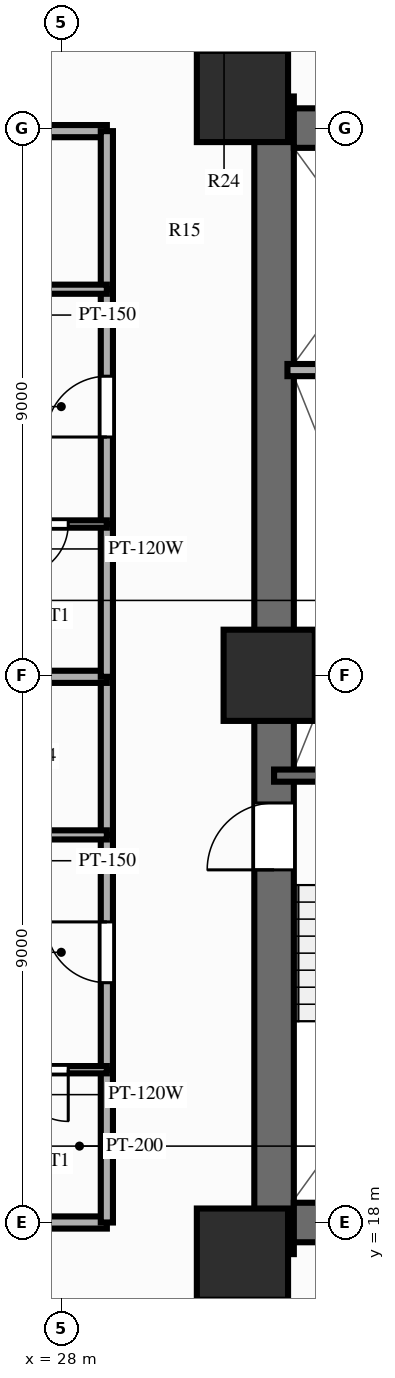
"""IFC4 building model, lengths in metres.
Left out: names, types, materials, properties, quantities, classifications, styles, units other than length and angle.
Written with IfcOpenShell. Run it as: python <this file> out.ifc"""

import sys

from ifc_helpers import new_model, si_unit, direction, frame, frame_2d, origin, origin_2d, place, context, subcontext, project, spatial, rectangle, extrude, source, transform, mapped, element, fill, save


model = new_model("IFC4")
c1 = context("Model", 3, precision=1e-05, world=origin(), true_north=direction((0.0, 1.0)))
c2 = subcontext(c1, "Body", "Model", "MODEL_VIEW")
j1 = project(units=[si_unit("LENGTHUNIT", "METRE"), si_unit("PLANEANGLEUNIT", "RADIAN")], contexts=[c1])
p1 = place(None, origin())
s1 = spatial("IfcSite", under=j1, at=p1, CompositionType="ELEMENT")
p2 = place(p1, origin())
s2 = spatial("IfcBuilding", under=s1, at=p2, CompositionType="ELEMENT")
p3 = place(p2, frame((0.0, 0.0, 43.4)))
s3 = spatial("IfcBuildingStorey", under=s2, at=p3, CompositionType="ELEMENT", Elevation=43.4)
p4 = place(p3, frame((31.5, 17.48, 0.0), z_axis=(0.0, 0.0, 1.0), x_axis=(0.0, 1.0, 0.0)))
e1 = element("IfcWall", 1, at=p4, inside=s3, PredefinedType="SHEAR", context=c2, shape_type="SweptSolid", body=[
    extrude(rectangle(XDim=19.04, YDim=0.65, at=frame_2d((9.52, 0.0))), origin(), (0.0, 0.0, 1.0), 3.0),
])
p5 = place(p4, frame((6.32, 0.0, 0.0)))
e2 = element("IfcOpeningElement", 2, at=p5, cuts=e1, PredefinedType="OPENING", context=c2, shape_type="SweptSolid", body=[
    extrude(rectangle(XDim=1.1, YDim=2.15, at=frame_2d((0.55, 1.075))), frame((0.0, 0.337, 0.0), z_axis=(0.0, -1.0, 0.0), x_axis=(1.0, 0.0, 0.0)), (0.0, 0.0, 1.0), 0.674),
])
p6 = place(p3, frame((31.825, 18.0, 0.0), z_axis=(0.0, 0.0, 1.0), x_axis=(1.0, 0.0, 0.0)))
e3 = element("IfcWall", 3, at=p6, inside=s3, PredefinedType="SHEAR", context=c2, shape_type="SweptSolid", body=[
    extrude(rectangle(XDim=12.35, YDim=0.65, at=frame_2d((6.175, 0.0))), origin(), (0.0, 0.0, 1.0), 3.0),
])
p7 = place(p3, frame((31.825, 36.0, 0.0), z_axis=(0.0, 0.0, 1.0), x_axis=(1.0, 0.0, 0.0)))
e4 = element("IfcWall", 4, at=p7, inside=s3, PredefinedType="SHEAR", context=c2, shape_type="SweptSolid", body=[
    extrude(rectangle(XDim=12.35, YDim=0.65, at=frame_2d((6.175, 0.0))), origin(), (0.0, 0.0, 1.0), 3.0),
])
p8 = place(p7, frame((5.125, 0.0, 0.0), z_axis=(0.0, 0.0, 1.0), x_axis=(-1.0, 0.0, 0.0)))
e5 = element("IfcOpeningElement", 5, at=p8, cuts=e4, PredefinedType="OPENING", context=c2, shape_type="SweptSolid", body=[
    extrude(rectangle(XDim=1.4, YDim=2.15, at=frame_2d((0.7, 1.075))), frame((0.0, 0.337, 0.0), z_axis=(0.0, -1.0, 0.0), x_axis=(1.0, 0.0, 0.0)), (0.0, 0.0, 1.0), 0.674),
])
m1 = source(origin(), c2, "Body", "SweptSolid", [
    extrude(rectangle(XDim=1.5, YDim=1.5, at=origin_2d()), origin(), (0.0, 0.0, 1.0), 3.0),
])
for number, where, z_axis, x_axis in (
    (6, (30.98, 17.48, 0.0), (0.0, 0.0, 1.0), (1.0, 0.0, 0.0)),
    (7, (30.98, 36.52, 0.0), (0.0, 0.0, 1.0), (1.0, 0.0, 0.0)),
    (8, (31.42, 27.0, 0.0), (0.0, 0.0, 1.0), (1.0, 0.0, 0.0)),
):
    element("IfcColumn", number, at=place(p3, frame(where, z_axis=z_axis, x_axis=x_axis)), inside=s3, PredefinedType="COLUMN", context=c2, shape_type="MappedRepresentation", body=[
        mapped(m1, transform((0.0, 0.0, 0.0), scale=1.0)),
    ])
p9 = place(p3, frame((31.5, 25.35, 0.0), z_axis=(0.0, 0.0, 1.0), x_axis=(1.0, 0.0, 0.0)))
e9 = element("IfcWall", 9, at=p9, inside=s3, PredefinedType="SOLIDWALL", context=c2, shape_type="SweptSolid", body=[
    extrude(rectangle(XDim=3.93, YDim=0.2, at=frame_2d((1.965, 0.0))), origin(), (0.0, 0.0, 1.0), 2.79),
])
p10 = place(p3, frame((31.72, 32.02, 0.0), z_axis=(0.0, 0.0, 1.0), x_axis=(1.0, 0.0, 0.0)))
e10 = element("IfcWall", 10, at=p10, inside=s3, PredefinedType="PARTITIONING", context=c2, shape_type="SweptSolid", body=[
    extrude(rectangle(XDim=2.8, YDim=0.2, at=frame_2d((1.4, 0.0))), origin(), (0.0, 0.0, 1.0), 2.79),
])
for number, where, z_axis, x_axis in (
    (11, (28.75, 18.0, 0.0), (0.0, 0.0, 1.0), (-1.0, 0.0, 0.0)),
    (12, (28.75, 35.95, 0.0), (0.0, 0.0, 1.0), (-1.0, 0.0, 0.0)),
):
    element("IfcWall", number, at=place(p3, frame(where, z_axis=z_axis, x_axis=x_axis)), inside=s3, PredefinedType="PARTITIONING", context=c2, shape_type="SweptSolid", body=[
        extrude(rectangle(XDim=16.6, YDim=0.2, at=frame_2d((8.3, 0.0))), origin(), (0.0, 0.0, 1.0), 2.24),
    ])
p11 = place(p3, frame((28.75, 18.0, 0.0), z_axis=(0.0, 0.0, 1.0), x_axis=(0.0, 1.0, 0.0)))
e13 = element("IfcWall", 13, at=p11, inside=s3, PredefinedType="PARTITIONING", context=c2, shape_type="SweptSolid", body=[
    extrude(rectangle(XDim=2.513, YDim=0.2, at=frame_2d((1.256, 0.0))), origin(), (0.0, 0.0, 1.0), 2.79),
])
p12 = place(p3, frame((28.75, 20.513, 0.0), z_axis=(0.0, 0.0, 1.0), x_axis=(0.0, 1.0, 0.0)))
e14 = element("IfcWall", 14, at=p12, inside=s3, PredefinedType="PARTITIONING", context=c2, shape_type="SweptSolid", body=[
    extrude(rectangle(XDim=3.862, YDim=0.2, at=frame_2d((1.931, 0.0))), origin(), (0.0, 0.0, 1.0), 2.79),
])
p13 = place(p12, frame((1.431, 0.0, 0.0)))
e15 = element("IfcOpeningElement", 15, at=p13, cuts=e14, PredefinedType="OPENING", context=c2, shape_type="SweptSolid", body=[
    extrude(rectangle(XDim=1.0, YDim=2.15, at=frame_2d((0.5, 1.075))), frame((0.0, 0.112, 0.0), z_axis=(0.0, -1.0, 0.0), x_axis=(1.0, 0.0, 0.0)), (0.0, 0.0, 1.0), 0.224),
])
p14 = place(p3, frame((28.75, 24.375, 0.0), z_axis=(0.0, 0.0, 1.0), x_axis=(0.0, 1.0, 0.0)))
e16 = element("IfcWall", 16, at=p14, inside=s3, PredefinedType="PARTITIONING", context=c2, shape_type="SweptSolid", body=[
    extrude(rectangle(XDim=2.6, YDim=0.2, at=frame_2d((1.3, 0.0))), origin(), (0.0, 0.0, 1.0), 2.79),
])
p15 = place(p3, frame((28.75, 20.513, 0.0), z_axis=(0.0, 0.0, 1.0), x_axis=(-1.0, 0.0, 0.0)))
e17 = element("IfcWall", 17, at=p15, inside=s3, PredefinedType="PARTITIONING", context=c2, shape_type="SweptSolid", body=[
    extrude(rectangle(XDim=2.12, YDim=0.12, at=frame_2d((1.06, 0.0))), origin(), (0.0, 0.0, 1.0), 2.79),
])
p16 = place(p15, frame((0.635, 0.0, 0.0)))
e18 = element("IfcOpeningElement", 18, at=p16, cuts=e17, PredefinedType="OPENING", context=c2, shape_type="SweptSolid", body=[
    extrude(rectangle(XDim=0.85, YDim=2.05, at=frame_2d((0.425, 1.025))), frame((0.0, 0.072, 0.0), z_axis=(0.0, -1.0, 0.0), x_axis=(1.0, 0.0, 0.0)), (0.0, 0.0, 1.0), 0.144),
])
p17 = place(p3, frame((28.75, 24.375, 0.0), z_axis=(0.0, 0.0, 1.0), x_axis=(-1.0, 0.0, 0.0)))
e19 = element("IfcWall", 19, at=p17, inside=s3, PredefinedType="PARTITIONING", context=c2, shape_type="SweptSolid", body=[
    extrude(rectangle(XDim=3.07, YDim=0.15, at=frame_2d((1.535, 0.0))), origin(), (0.0, 0.0, 1.0), 2.79),
])
p18 = place(p17, frame((1.085, 0.0, 0.0)))
e20 = element("IfcOpeningElement", 20, at=p18, cuts=e19, PredefinedType="OPENING", context=c2, shape_type="SweptSolid", body=[
    extrude(rectangle(XDim=0.9, YDim=2.1, at=frame_2d((0.45, 1.05))), frame((0.0, 0.087, 0.0), z_axis=(0.0, -1.0, 0.0), x_axis=(1.0, 0.0, 0.0)), (0.0, 0.0, 1.0), 0.174),
])
p19 = place(p3, frame((28.75, 26.975, 0.0), z_axis=(0.0, 0.0, 1.0), x_axis=(-1.0, 0.0, 0.0)))
e21 = element("IfcWall", 21, at=p19, inside=s3, PredefinedType="PARTITIONING", context=c2, shape_type="SweptSolid", body=[
    extrude(rectangle(XDim=16.6, YDim=0.2, at=frame_2d((8.3, 0.0))), origin(), (0.0, 0.0, 1.0), 2.79),
])
p20 = place(p3, frame((28.75, 26.975, 0.0), z_axis=(0.0, 0.0, 1.0), x_axis=(0.0, 1.0, 0.0)))
e22 = element("IfcWall", 22, at=p20, inside=s3, PredefinedType="PARTITIONING", context=c2, shape_type="SweptSolid", body=[
    extrude(rectangle(XDim=2.513, YDim=0.2, at=frame_2d((1.256, 0.0))), origin(), (0.0, 0.0, 1.0), 2.79),
])
p21 = place(p3, frame((28.75, 29.488, 0.0), z_axis=(0.0, 0.0, 1.0), x_axis=(0.0, 1.0, 0.0)))
e23 = element("IfcWall", 23, at=p21, inside=s3, PredefinedType="PARTITIONING", context=c2, shape_type="SweptSolid", body=[
    extrude(rectangle(XDim=3.862, YDim=0.2, at=frame_2d((1.931, 0.0))), origin(), (0.0, 0.0, 1.0), 2.79),
])
p22 = place(p21, frame((1.431, 0.0, 0.0)))
e24 = element("IfcOpeningElement", 24, at=p22, cuts=e23, PredefinedType="OPENING", context=c2, shape_type="SweptSolid", body=[
    extrude(rectangle(XDim=1.0, YDim=2.15, at=frame_2d((0.5, 1.075))), frame((0.0, 0.112, 0.0), z_axis=(0.0, -1.0, 0.0), x_axis=(1.0, 0.0, 0.0)), (0.0, 0.0, 1.0), 0.224),
])
p23 = place(p3, frame((28.75, 33.35, 0.0), z_axis=(0.0, 0.0, 1.0), x_axis=(0.0, 1.0, 0.0)))
e25 = element("IfcWall", 25, at=p23, inside=s3, PredefinedType="PARTITIONING", context=c2, shape_type="SweptSolid", body=[
    extrude(rectangle(XDim=2.6, YDim=0.2, at=frame_2d((1.3, 0.0))), origin(), (0.0, 0.0, 1.0), 2.79),
])
p24 = place(p3, frame((28.75, 29.488, 0.0), z_axis=(0.0, 0.0, 1.0), x_axis=(-1.0, 0.0, 0.0)))
e26 = element("IfcWall", 26, at=p24, inside=s3, PredefinedType="PARTITIONING", context=c2, shape_type="SweptSolid", body=[
    extrude(rectangle(XDim=2.12, YDim=0.12, at=frame_2d((1.06, 0.0))), origin(), (0.0, 0.0, 1.0), 2.79),
])
p25 = place(p24, frame((0.635, 0.0, 0.0)))
e27 = element("IfcOpeningElement", 27, at=p25, cuts=e26, PredefinedType="OPENING", context=c2, shape_type="SweptSolid", body=[
    extrude(rectangle(XDim=0.85, YDim=2.05, at=frame_2d((0.425, 1.025))), frame((0.0, 0.072, 0.0), z_axis=(0.0, -1.0, 0.0), x_axis=(1.0, 0.0, 0.0)), (0.0, 0.0, 1.0), 0.144),
])
p26 = place(p3, frame((28.75, 33.35, 0.0), z_axis=(0.0, 0.0, 1.0), x_axis=(-1.0, 0.0, 0.0)))
e28 = element("IfcWall", 28, at=p26, inside=s3, PredefinedType="PARTITIONING", context=c2, shape_type="SweptSolid", body=[
    extrude(rectangle(XDim=3.07, YDim=0.15, at=frame_2d((1.535, 0.0))), origin(), (0.0, 0.0, 1.0), 2.79),
])
p27 = place(p26, frame((1.085, 0.0, 0.0)))
e29 = element("IfcOpeningElement", 29, at=p27, cuts=e28, PredefinedType="OPENING", context=c2, shape_type="SweptSolid", body=[
    extrude(rectangle(XDim=0.9, YDim=2.1, at=frame_2d((0.45, 1.05))), frame((0.0, 0.087, 0.0), z_axis=(0.0, -1.0, 0.0), x_axis=(1.0, 0.0, 0.0)), (0.0, 0.0, 1.0), 0.174),
])
m2 = source(origin(), c2, "Body", "SweptSolid", [
    extrude(rectangle(XDim=1.1, YDim=2.15, at=frame_2d((0.55, 1.075))), frame((0.0, 0.025, 0.0), z_axis=(0.0, -1.0, 0.0), x_axis=(1.0, 0.0, 0.0)), (0.0, 0.0, 1.0), 0.05),
])
p28 = place(p5, origin())
e30 = element("IfcDoor", 30, at=p28, inside=s3, OperationType="SINGLE_SWING_LEFT", PredefinedType="DOOR", context=c2, shape_type="MappedRepresentation", body=[
    mapped(m2, transform((0.0, 0.0, 0.0), scale=1.0)),
])
fill(e2, e30)
m3 = source(origin(), c2, "Body", "SweptSolid", [
    extrude(rectangle(XDim=1.0, YDim=2.15, at=frame_2d((0.5, 1.075))), frame((0.0, 0.025, 0.0), z_axis=(0.0, -1.0, 0.0), x_axis=(1.0, 0.0, 0.0)), (0.0, 0.0, 1.0), 0.05),
])
p29 = place(p13, origin())
e31 = element("IfcDoor", 31, at=p29, inside=s3, OperationType="SINGLE_SWING_RIGHT", PredefinedType="DOOR", context=c2, shape_type="MappedRepresentation", body=[
    mapped(m3, transform((0.0, 0.0, 0.0), scale=1.0)),
])
fill(e15, e31)
m4 = source(origin(), c2, "Body", "SweptSolid", [
    extrude(rectangle(XDim=0.85, YDim=2.05, at=frame_2d((0.425, 1.025))), frame((0.0, 0.025, 0.0), z_axis=(0.0, -1.0, 0.0), x_axis=(1.0, 0.0, 0.0)), (0.0, 0.0, 1.0), 0.05),
])
p30 = place(p16, origin())
e32 = element("IfcDoor", 32, at=p30, inside=s3, OperationType="SINGLE_SWING_LEFT", PredefinedType="DOOR", context=c2, shape_type="MappedRepresentation", body=[
    mapped(m4, transform((0.0, 0.0, 0.0), scale=1.0)),
])
fill(e18, e32)
p31 = place(p22, origin())
e33 = element("IfcDoor", 33, at=p31, inside=s3, OperationType="SINGLE_SWING_LEFT", PredefinedType="DOOR", context=c2, shape_type="MappedRepresentation", body=[
    mapped(m3, transform((0.0, 0.0, 0.0), scale=1.0)),
])
fill(e24, e33)
p32 = place(p25, origin())
e34 = element("IfcDoor", 34, at=p32, inside=s3, OperationType="SINGLE_SWING_RIGHT", PredefinedType="DOOR", context=c2, shape_type="MappedRepresentation", body=[
    mapped(m4, transform((0.0, 0.0, 0.0), scale=1.0)),
])
fill(e27, e34)
save(model, sys.argv[1])
